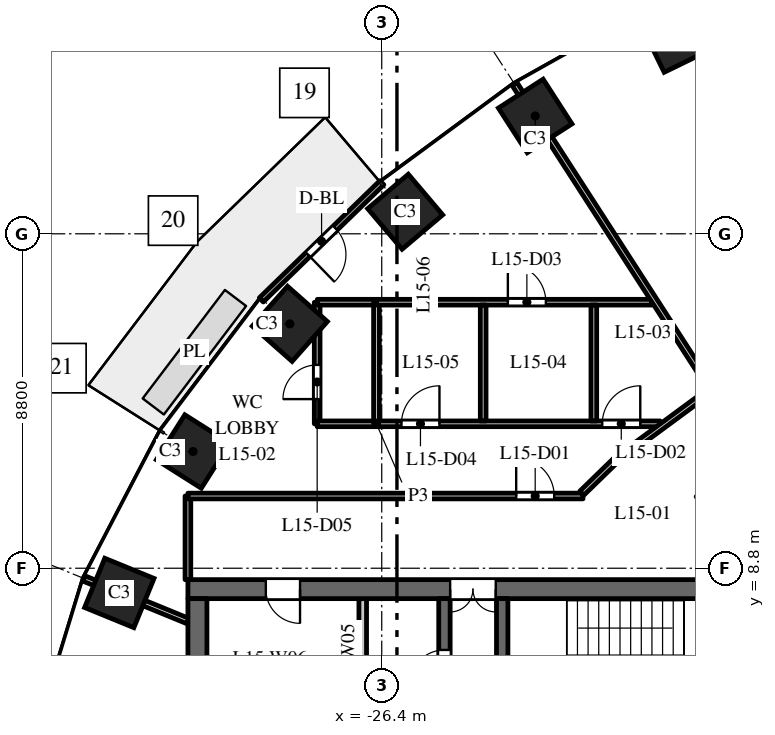
"""IFC4 building model, lengths in metres.
Left out: names, types, materials, properties, quantities, classifications, styles, units other than length and angle.
Written with IfcOpenShell. Run it as: python <this file> out.ifc"""

import sys

from ifc_helpers import new_model, si_unit, direction, frame, frame_2d, origin, origin_2d, place, context, subcontext, project, spatial, rectangle, extrude, element, fill, save


model = new_model("IFC4")
c1 = context("Model", 3, precision=1e-05, world=origin(), true_north=direction((0.0, 1.0)))
c2 = subcontext(c1, "Body", "Model", "MODEL_VIEW")
j1 = project(units=[si_unit("LENGTHUNIT", "METRE"), si_unit("PLANEANGLEUNIT", "RADIAN")], contexts=[c1])
p1 = place(None, origin())
s1 = spatial("IfcSite", under=j1, at=p1, CompositionType="ELEMENT")
p2 = place(p1, origin())
s2 = spatial("IfcBuilding", under=s1, at=p2, CompositionType="ELEMENT")
p3 = place(p2, frame((0.0, 0.0, 70.5)))
s3 = spatial("IfcBuildingStorey", under=s2, at=p3, CompositionType="ELEMENT", Elevation=70.5)
for number, where, z_axis, x_axis in (
    (1, (-18.646, 22.785, 0.0), (0.0, 0.0, 1.0), (-0.898, -0.439, 0.0)),
    (2, (-22.362, 20.7, 0.0), (0.0, 0.0, 1.0), (-0.84, -0.542, 0.0)),
    (3, (-25.783, 18.18, 0.0), (0.0, 0.0, 1.0), (-0.763, -0.646, 0.0)),
    (4, (-28.819, 15.23, 0.0), (0.0, 0.0, 1.0), (-0.663, -0.749, 0.0)),
    (5, (-31.365, 11.871, 0.0), (0.0, 0.0, 1.0), (-0.535, -0.845, 0.0)),
    (6, (-33.305, 8.149, 0.0), (0.0, 0.0, 1.0), (-0.379, -0.925, 0.0)),
):
    element("IfcColumn", number, at=place(p3, frame(where, z_axis=z_axis, x_axis=x_axis)), inside=s3, PredefinedType="COLUMN", context=c2, shape_type="SweptSolid", body=[
        extrude(rectangle(XDim=1.4, YDim=1.4, at=origin_2d()), origin(), (0.0, 0.0, 1.0), 4.0),
    ])
p4 = place(p3, frame((-16.5, 8.25, 0.0), z_axis=(0.0, 0.0, 1.0), x_axis=(-1.0, 0.0, 0.0)))
e7 = element("IfcWall", 7, at=p4, inside=s3, PredefinedType="SHEAR", context=c2, shape_type="SweptSolid", body=[
    extrude(rectangle(XDim=15.0, YDim=0.5, at=frame_2d((7.5, 0.0))), origin(), (0.0, 0.0, 1.0), 3.7),
])
p5 = place(p4, frame((6.9, 0.0, 0.0)))
e8 = element("IfcOpeningElement", 8, at=p5, cuts=e7, PredefinedType="OPENING", context=c2, shape_type="SweptSolid", body=[
    extrude(rectangle(XDim=1.2, YDim=2.1, at=frame_2d((0.6, 1.05))), frame((0.0, 0.26, 0.0), z_axis=(0.0, -1.0, 0.0), x_axis=(1.0, 0.0, 0.0)), (0.0, 0.0, 1.0), 0.52),
])
p6 = place(p4, frame((12.05, 0.0, 0.0)))
e9 = element("IfcOpeningElement", 9, at=p6, cuts=e7, PredefinedType="OPENING", context=c2, shape_type="SweptSolid", body=[
    extrude(rectangle(XDim=0.9, YDim=2.1, at=frame_2d((0.45, 1.05))), frame((0.0, 0.26, 0.0), z_axis=(0.0, -1.0, 0.0), x_axis=(1.0, 0.0, 0.0)), (0.0, 0.0, 1.0), 0.52),
])
p7 = place(p3, frame((-24.75, -8.0, 0.0), z_axis=(0.0, 0.0, 1.0), x_axis=(0.0, 1.0, 0.0)))
e10 = element("IfcWall", 10, at=p7, inside=s3, PredefinedType="SHEAR", context=c2, shape_type="SweptSolid", body=[
    extrude(rectangle(XDim=16.0, YDim=0.3, at=frame_2d((8.0, 0.0))), origin(), (0.0, 0.0, 1.0), 3.7),
])
p8 = place(p7, frame((4.425, 0.0, 0.0)))
e11 = element("IfcOpeningElement", 11, at=p8, cuts=e10, PredefinedType="OPENING", context=c2, shape_type="SweptSolid", body=[
    extrude(rectangle(XDim=1.1, YDim=2.1, at=frame_2d((0.55, 1.05))), frame((0.0, 0.16, 0.0), z_axis=(0.0, -1.0, 0.0), x_axis=(1.0, 0.0, 0.0)), (0.0, 0.0, 1.0), 0.32),
])
p9 = place(p7, frame((7.45, 0.0, 0.0)))
e12 = element("IfcOpeningElement", 12, at=p9, cuts=e10, PredefinedType="OPENING", context=c2, shape_type="SweptSolid", body=[
    extrude(rectangle(XDim=1.1, YDim=2.1, at=frame_2d((0.55, 1.05))), frame((0.0, 0.16, 0.0), z_axis=(0.0, -1.0, 0.0), x_axis=(1.0, 0.0, 0.0)), (0.0, 0.0, 1.0), 0.32),
])
p10 = place(p7, frame((10.425, 0.0, 0.0)))
e13 = element("IfcOpeningElement", 13, at=p10, cuts=e10, PredefinedType="OPENING", context=c2, shape_type="SweptSolid", body=[
    extrude(rectangle(XDim=1.2, YDim=2.1, at=frame_2d((0.6, 1.05))), frame((0.0, 0.16, 0.0), z_axis=(0.0, -1.0, 0.0), x_axis=(1.0, 0.0, 0.0)), (0.0, 0.0, 1.0), 0.32),
])
p11 = place(p7, frame((13.75, 0.0, 0.0)))
e14 = element("IfcOpeningElement", 14, at=p11, cuts=e10, PredefinedType="OPENING", context=c2, shape_type="SweptSolid", body=[
    extrude(rectangle(XDim=0.9, YDim=2.1, at=frame_2d((0.45, 1.05))), frame((0.0, 0.16, 0.0), z_axis=(0.0, -1.0, 0.0), x_axis=(1.0, 0.0, 0.0)), (0.0, 0.0, 1.0), 0.32),
])
p12 = place(p7, frame((1.35, 0.0, 0.0)))
e15 = element("IfcOpeningElement", 15, at=p12, cuts=e10, PredefinedType="OPENING", context=c2, shape_type="SweptSolid", body=[
    extrude(rectangle(XDim=0.9, YDim=2.1, at=frame_2d((0.45, 1.05))), frame((0.0, 0.16, 0.0), z_axis=(0.0, -1.0, 0.0), x_axis=(1.0, 0.0, 0.0)), (0.0, 0.0, 1.0), 0.32),
])
p13 = place(p3, frame((-31.25, -8.0, 0.0), z_axis=(0.0, 0.0, 1.0), x_axis=(0.0, 1.0, 0.0)))
e16 = element("IfcWall", 16, at=p13, inside=s3, PredefinedType="SHEAR", context=c2, shape_type="SweptSolid", body=[
    extrude(rectangle(XDim=16.0, YDim=0.5, at=frame_2d((8.0, 0.0))), origin(), (0.0, 0.0, 1.0), 3.7),
])
p14 = place(p3, frame((-26.9, 4.75, 0.0), z_axis=(0.0, 0.0, 1.0), x_axis=(0.0, 1.0, 0.0)))
e17 = element("IfcWall", 17, at=p14, inside=s3, PredefinedType="PARTITIONING", context=c2, shape_type="SweptSolid", body=[
    extrude(rectangle(XDim=3.25, YDim=0.2, at=frame_2d((1.625, 0.0))), origin(), (0.0, 0.0, 1.0), 3.7),
])
p15 = place(p3, frame((-23.23, 2.25, 0.0), z_axis=(0.0, 0.0, 1.0), x_axis=(0.0, 1.0, 0.0)))
e18 = element("IfcWall", 18, at=p15, inside=s3, PredefinedType="SHEAR", context=c2, shape_type="SweptSolid", body=[
    extrude(rectangle(XDim=5.75, YDim=0.3, at=frame_2d((2.875, 0.0))), origin(), (0.0, 0.0, 1.0), 3.7),
])
p16 = place(p15, frame((0.6, 0.0, 0.0)))
e19 = element("IfcOpeningElement", 19, at=p16, cuts=e18, PredefinedType="OPENING", context=c2, shape_type="SweptSolid", body=[
    extrude(rectangle(XDim=1.0, YDim=2.1, at=frame_2d((0.5, 1.05))), frame((0.0, 0.16, 0.0), z_axis=(0.0, -1.0, 0.0), x_axis=(1.0, 0.0, 0.0)), (0.0, 0.0, 1.0), 0.32),
])
p17 = place(p3, frame((-26.396, 18.943, 0.0), z_axis=(0.0, 0.0, 1.0), x_axis=(-0.717214761864, -0.696852197647, 0.0)))
e20 = element("IfcWall", 20, at=p17, inside=s3, PredefinedType="STANDARD", context=c2, shape_type="SweptSolid", body=[
    extrude(rectangle(XDim=4.424, YDim=0.15, at=frame_2d((2.212, 0.0))), origin(), (0.0, 0.0, 1.0), 3.7),
])
p18 = place(p17, frame((1.712, 0.0, 0.0)))
e21 = element("IfcOpeningElement", 21, at=p18, cuts=e20, PredefinedType="OPENING", context=c2, shape_type="SweptSolid", body=[
    extrude(rectangle(XDim=1.0, YDim=2.4, at=frame_2d((0.5, 1.2))), frame((0.0, 0.085, 0.0), z_axis=(0.0, -1.0, 0.0), x_axis=(1.0, 0.0, 0.0)), (0.0, 0.0, 1.0), 0.17),
])
p19 = place(p3, frame((-34.234, 8.53, 0.0), z_axis=(0.0, 0.0, 1.0), x_axis=(0.925344112436, -0.379128307542, 0.0)))
e22 = element("IfcWall", 22, at=p19, inside=s3, PredefinedType="PARTITIONING", context=c2, shape_type="SweptSolid", body=[
    extrude(rectangle(XDim=2.954, YDim=0.15, at=frame_2d((1.477, 0.0))), origin(), (0.0, 0.0, 1.0), 2.85),
])
p20 = place(p3, frame((-31.5, 8.5, 0.0), z_axis=(0.0, 0.0, 1.0), x_axis=(0.0, 1.0, 0.0)))
e23 = element("IfcWall", 23, at=p20, inside=s3, PredefinedType="PARTITIONING", context=c2, shape_type="SweptSolid", body=[
    extrude(rectangle(XDim=2.2, YDim=0.15, at=frame_2d((1.1, 0.0))), origin(), (0.0, 0.0, 1.0), 3.7),
])
p21 = place(p3, frame((-31.5, 10.7, 0.0), z_axis=(0.0, 0.0, 1.0), x_axis=(1.0, 0.0, 0.0)))
e24 = element("IfcWall", 24, at=p21, inside=s3, PredefinedType="PARTITIONING", context=c2, shape_type="SweptSolid", body=[
    extrude(rectangle(XDim=10.396, YDim=0.15, at=frame_2d((5.198, 0.0))), origin(), (0.0, 0.0, 1.0), 3.1),
])
p22 = place(p21, frame((8.638, 0.0, 0.0)))
e25 = element("IfcOpeningElement", 25, at=p22, cuts=e24, PredefinedType="OPENING", context=c2, shape_type="SweptSolid", body=[
    extrude(rectangle(XDim=1.0, YDim=2.1, at=frame_2d((0.5, 1.05))), frame((0.0, 0.085, 0.0), z_axis=(0.0, -1.0, 0.0), x_axis=(1.0, 0.0, 0.0)), (0.0, 0.0, 1.0), 0.17),
])
p23 = place(p3, frame((-28.099, 12.6, 0.0), z_axis=(0.0, 0.0, 1.0), x_axis=(0.0, 1.0, 0.0)))
e26 = element("IfcWall", 26, at=p23, inside=s3, PredefinedType="PARTITIONING", context=c2, shape_type="SweptSolid", body=[
    extrude(rectangle(XDim=3.196, YDim=0.15, at=frame_2d((1.598, 0.0))), origin(), (0.0, 0.0, 1.0), 2.85),
])
p24 = place(p23, frame((0.65, 0.0, 0.0)))
e27 = element("IfcOpeningElement", 27, at=p24, cuts=e26, PredefinedType="OPENING", context=c2, shape_type="SweptSolid", body=[
    extrude(rectangle(XDim=0.9, YDim=2.1, at=frame_2d((0.45, 1.05))), frame((0.0, 0.085, 0.0), z_axis=(0.0, -1.0, 0.0), x_axis=(1.0, 0.0, 0.0)), (0.0, 0.0, 1.0), 0.17),
])
p25 = place(p3, frame((-28.099, 12.6, 0.0), z_axis=(0.0, 0.0, 1.0), x_axis=(1.0, 0.0, 0.0)))
e28 = element("IfcWall", 28, at=p25, inside=s3, PredefinedType="PARTITIONING", context=c2, shape_type="SweptSolid", body=[
    extrude(rectangle(XDim=1.56, YDim=0.15, at=frame_2d((0.78, 0.0))), origin(), (0.0, 0.0, 1.0), 3.7),
])
p26 = place(p3, frame((-28.095, 15.8, 0.0), z_axis=(0.0, 0.0, 1.0), x_axis=(1.0, 0.0, 0.0)))
e29 = element("IfcWall", 29, at=p26, inside=s3, PredefinedType="PARTITIONING", context=c2, shape_type="SweptSolid", body=[
    extrude(rectangle(XDim=1.556, YDim=0.15, at=frame_2d((0.778, 0.0))), origin(), (0.0, 0.0, 1.0), 2.85),
])
p27 = place(p3, frame((-26.539, 12.6, 0.0), z_axis=(0.0, 0.0, 1.0), x_axis=(0.0, 1.0, 0.0)))
e30 = element("IfcWall", 30, at=p27, inside=s3, PredefinedType="PARTITIONING", context=c2, shape_type="SweptSolid", body=[
    extrude(rectangle(XDim=3.2, YDim=0.15, at=frame_2d((1.6, 0.0))), origin(), (0.0, 0.0, 1.0), 3.7),
])
p28 = place(p3, frame((-26.539, 12.6, 0.0), z_axis=(0.0, 0.0, 1.0), x_axis=(1.0, 0.0, 0.0)))
e31 = element("IfcWall", 31, at=p28, inside=s3, PredefinedType="PARTITIONING", context=c2, shape_type="SweptSolid", body=[
    extrude(rectangle(XDim=7.466, YDim=0.15, at=frame_2d((3.733, 0.0))), origin(), (0.0, 0.0, 1.0), 3.7),
])
p29 = place(p28, frame((5.942, 0.0, 0.0)))
e32 = element("IfcOpeningElement", 32, at=p29, cuts=e31, PredefinedType="OPENING", context=c2, shape_type="SweptSolid", body=[
    extrude(rectangle(XDim=1.0, YDim=2.1, at=frame_2d((0.5, 1.05))), frame((0.0, 0.085, 0.0), z_axis=(0.0, -1.0, 0.0), x_axis=(1.0, 0.0, 0.0)), (0.0, 0.0, 1.0), 0.17),
])
p30 = place(p28, frame((0.658, 0.0, 0.0)))
e33 = element("IfcOpeningElement", 33, at=p30, cuts=e31, PredefinedType="OPENING", context=c2, shape_type="SweptSolid", body=[
    extrude(rectangle(XDim=1.0, YDim=2.1, at=frame_2d((0.5, 1.05))), frame((0.0, 0.085, 0.0), z_axis=(0.0, -1.0, 0.0), x_axis=(1.0, 0.0, 0.0)), (0.0, 0.0, 1.0), 0.17),
])
p31 = place(p3, frame((-26.539, 15.8, 0.0), z_axis=(0.0, 0.0, 1.0), x_axis=(1.0, 0.0, 0.0)))
e34 = element("IfcWall", 34, at=p31, inside=s3, PredefinedType="PARTITIONING", context=c2, shape_type="SweptSolid", body=[
    extrude(rectangle(XDim=7.247, YDim=0.15, at=frame_2d((3.624, 0.0))), origin(), (0.0, 0.0, 1.0), 2.75),
])
p32 = place(p31, frame((3.458, 0.0, 0.0)))
e35 = element("IfcOpeningElement", 35, at=p32, cuts=e34, PredefinedType="OPENING", context=c2, shape_type="SweptSolid", body=[
    extrude(rectangle(XDim=1.0, YDim=2.1, at=frame_2d((0.5, 1.05))), frame((0.0, 0.085, 0.0), z_axis=(0.0, -1.0, 0.0), x_axis=(1.0, 0.0, 0.0)), (0.0, 0.0, 1.0), 0.17),
])
p33 = place(p3, frame((-23.731, 12.675, 0.0), z_axis=(0.0, 0.0, 1.0), x_axis=(0.0, 1.0, 0.0)))
e36 = element("IfcWall", 36, at=p33, inside=s3, PredefinedType="PARTITIONING", context=c2, shape_type="SweptSolid", body=[
    extrude(rectangle(XDim=3.05, YDim=0.15, at=frame_2d((1.525, 0.0))), origin(), (0.0, 0.0, 1.0), 3.7),
])
p34 = place(p3, frame((-22.905, 21.542, 0.0), z_axis=(0.0, 0.0, 1.0), x_axis=(0.542244314938, -0.840220865557, 0.0)))
e37 = element("IfcWall", 37, at=p34, inside=s3, PredefinedType="PARTITIONING", context=c2, shape_type="SweptSolid", body=[
    extrude(rectangle(XDim=9.564, YDim=0.15, at=frame_2d((4.782, 0.0))), origin(), (0.0, 0.0, 1.0), 2.85),
])
p35 = place(p3, frame((-21.135, 10.775, 0.0), z_axis=(0.0, 0.0, 1.0), x_axis=(0.717043956417, 0.697027951065, 0.0)))
e38 = element("IfcWall", 38, at=p35, inside=s3, PredefinedType="PARTITIONING", context=c2, shape_type="SweptSolid", body=[
    extrude(rectangle(XDim=1.244, YDim=0.15, at=frame_2d((0.622, 0.0))), origin(), (0.0, 0.0, 1.0), 3.7),
])
p36 = place(p3, frame((-20.819, 12.675, 0.0), z_axis=(0.0, 0.0, 1.0), x_axis=(0.0, 1.0, 0.0)))
e39 = element("IfcWall", 39, at=p36, inside=s3, PredefinedType="PARTITIONING", context=c2, shape_type="SweptSolid", body=[
    extrude(rectangle(XDim=3.05, YDim=0.15, at=frame_2d((1.525, 0.0))), origin(), (0.0, 0.0, 1.0), 2.75),
])
p37 = place(p3, frame((-20.243, 11.642, 0.0), z_axis=(0.0, 0.0, 1.0), x_axis=(0.805148342369, 0.593073475027, 0.0)))
e40 = element("IfcWall", 40, at=p37, inside=s3, PredefinedType="PARTITIONING", context=c2, shape_type="SweptSolid", body=[
    extrude(rectangle(XDim=3.117, YDim=0.15, at=frame_2d((1.559, 0.0))), origin(), (0.0, 0.0, 1.0), 2.75),
])
p38 = place(p5, origin())
e41 = element("IfcDoor", 41, at=p38, inside=s3, OperationType="DOUBLE_DOOR_DOUBLE_SWING", PredefinedType="DOOR", context=c2, shape_type="SweptSolid", body=[
    extrude(rectangle(XDim=1.2, YDim=2.1, at=frame_2d((0.6, 1.05))), frame((0.0, 0.025, 0.0), z_axis=(0.0, -1.0, 0.0), x_axis=(1.0, 0.0, 0.0)), (0.0, 0.0, 1.0), 0.05),
])
fill(e8, e41)
p39 = place(p11, origin())
e42 = element("IfcDoor", 42, at=p39, inside=s3, OperationType="SINGLE_SWING_RIGHT", PredefinedType="DOOR", context=c2, shape_type="SweptSolid", body=[
    extrude(rectangle(XDim=0.9, YDim=2.1, at=frame_2d((0.45, 1.05))), frame((0.0, 0.025, 0.0), z_axis=(0.0, -1.0, 0.0), x_axis=(1.0, 0.0, 0.0)), (0.0, 0.0, 1.0), 0.05),
])
fill(e14, e42)
p40 = place(p6, origin())
e43 = element("IfcDoor", 43, at=p40, inside=s3, OperationType="SINGLE_SWING_RIGHT", PredefinedType="DOOR", context=c2, shape_type="SweptSolid", body=[
    extrude(rectangle(XDim=0.9, YDim=2.1, at=frame_2d((0.45, 1.05))), frame((0.0, 0.025, 0.0), z_axis=(0.0, -1.0, 0.0), x_axis=(1.0, 0.0, 0.0)), (0.0, 0.0, 1.0), 0.05),
])
fill(e9, e43)
p41 = place(p18, origin())
e44 = element("IfcDoor", 44, at=p41, inside=s3, OperationType="SINGLE_SWING_RIGHT", PredefinedType="DOOR", context=c2, shape_type="SweptSolid", body=[
    extrude(rectangle(XDim=1.0, YDim=2.4, at=frame_2d((0.5, 1.2))), frame((0.0, 0.025, 0.0), z_axis=(0.0, -1.0, 0.0), x_axis=(1.0, 0.0, 0.0)), (0.0, 0.0, 1.0), 0.05),
])
fill(e21, e44)
p42 = place(p22, origin())
e45 = element("IfcDoor", 45, at=p42, inside=s3, OperationType="SINGLE_SWING_LEFT", PredefinedType="DOOR", context=c2, shape_type="SweptSolid", body=[
    extrude(rectangle(XDim=1.0, YDim=2.1, at=frame_2d((0.5, 1.05))), frame((0.0, 0.025, 0.0), z_axis=(0.0, -1.0, 0.0), x_axis=(1.0, 0.0, 0.0)), (0.0, 0.0, 1.0), 0.05),
])
fill(e25, e45)
p43 = place(p29, origin())
e46 = element("IfcDoor", 46, at=p43, inside=s3, OperationType="SINGLE_SWING_RIGHT", PredefinedType="DOOR", context=c2, shape_type="SweptSolid", body=[
    extrude(rectangle(XDim=1.0, YDim=2.1, at=frame_2d((0.5, 1.05))), frame((0.0, 0.025, 0.0), z_axis=(0.0, -1.0, 0.0), x_axis=(1.0, 0.0, 0.0)), (0.0, 0.0, 1.0), 0.05),
])
fill(e32, e46)
p44 = place(p32, origin())
e47 = element("IfcDoor", 47, at=p44, inside=s3, OperationType="SINGLE_SWING_LEFT", PredefinedType="DOOR", context=c2, shape_type="SweptSolid", body=[
    extrude(rectangle(XDim=1.0, YDim=2.1, at=frame_2d((0.5, 1.05))), frame((0.0, 0.025, 0.0), z_axis=(0.0, -1.0, 0.0), x_axis=(1.0, 0.0, 0.0)), (0.0, 0.0, 1.0), 0.05),
])
fill(e35, e47)
p45 = place(p30, origin())
e48 = element("IfcDoor", 48, at=p45, inside=s3, OperationType="SINGLE_SWING_RIGHT", PredefinedType="DOOR", context=c2, shape_type="SweptSolid", body=[
    extrude(rectangle(XDim=1.0, YDim=2.1, at=frame_2d((0.5, 1.05))), frame((0.0, 0.025, 0.0), z_axis=(0.0, -1.0, 0.0), x_axis=(1.0, 0.0, 0.0)), (0.0, 0.0, 1.0), 0.05),
])
fill(e33, e48)
p46 = place(p24, origin())
e49 = element("IfcDoor", 49, at=p46, inside=s3, OperationType="SINGLE_SWING_LEFT", PredefinedType="DOOR", context=c2, shape_type="SweptSolid", body=[
    extrude(rectangle(XDim=0.9, YDim=2.1, at=frame_2d((0.45, 1.05))), frame((0.0, 0.025, 0.0), z_axis=(0.0, -1.0, 0.0), x_axis=(1.0, 0.0, 0.0)), (0.0, 0.0, 1.0), 0.05),
])
fill(e27, e49)
save(model, sys.argv[1])
